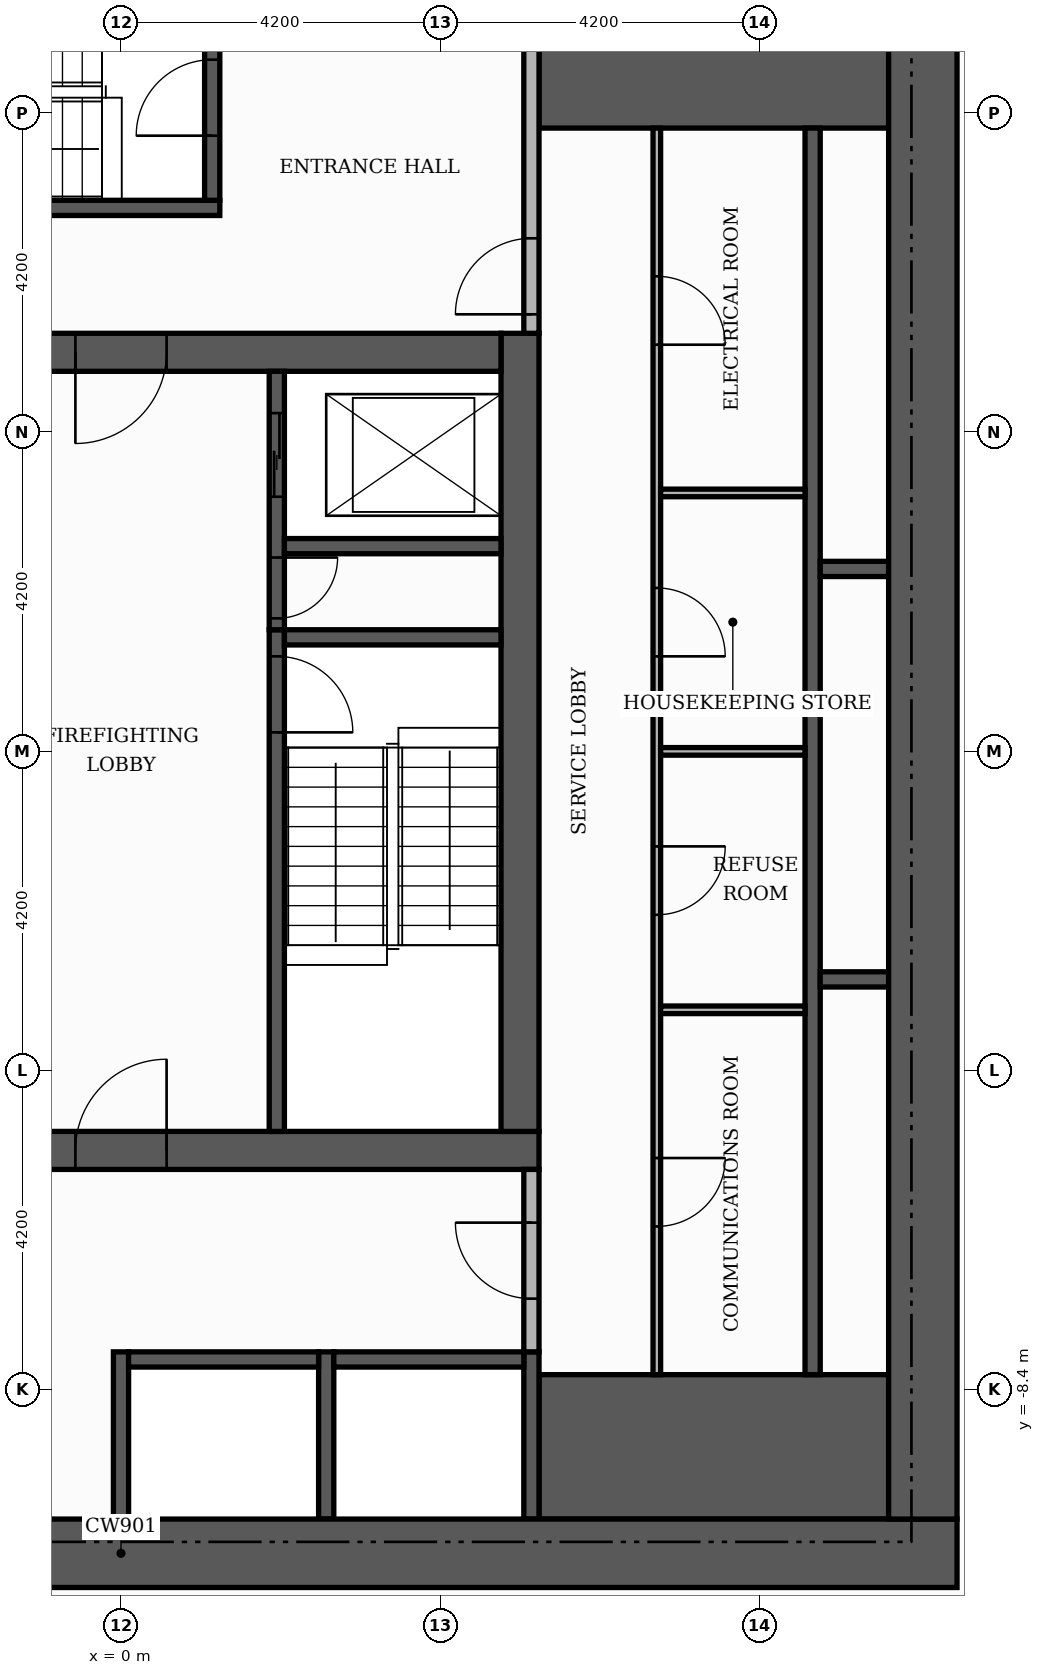
"""IFC4 building model, lengths in metres.
Left out: names, types, materials, properties, quantities, classifications, styles, units other than length and angle.
Written with IfcOpenShell. Run it as: python <this file> out.ifc"""

import sys

from ifc_helpers import new_model, si_unit, direction, frame, frame_2d, origin, place, context, subcontext, project, spatial, rectangle, extrude, element, fill, save


model = new_model("IFC4")
c1 = context("Model", 3, precision=1e-05, world=origin(), true_north=direction((0.0, 1.0)))
c2 = subcontext(c1, "Body", "Model", "MODEL_VIEW")
j1 = project(units=[si_unit("LENGTHUNIT", "METRE"), si_unit("PLANEANGLEUNIT", "RADIAN")], contexts=[c1])
p1 = place(None, origin())
s1 = spatial("IfcSite", under=j1, at=p1, CompositionType="ELEMENT")
p2 = place(p1, origin())
s2 = spatial("IfcBuilding", under=s1, at=p2, CompositionType="ELEMENT")
p3 = place(p2, frame((0.0, 0.0, 62.1)))
s3 = spatial("IfcBuildingStorey", under=s2, at=p3, CompositionType="ELEMENT", Elevation=62.1)
p4 = place(p3, frame((-5.5, -5.25, 0.0), z_axis=(0.0, 0.0, 1.0), x_axis=(1.0, 0.0, 0.0)))
e1 = element("IfcWall", 1, at=p4, inside=s3, PredefinedType="SHEAR", context=c2, shape_type="SweptSolid", body=[
    extrude(rectangle(XDim=11.0, YDim=0.5, at=frame_2d((5.5, 0.0))), origin(), (0.0, 0.0, 1.0), 3.48),
])
p5 = place(p4, frame((4.9, 0.0, 0.0)))
e2 = element("IfcOpeningElement", 2, at=p5, cuts=e1, PredefinedType="OPENING", context=c2, shape_type="SweptSolid", body=[
    extrude(rectangle(XDim=1.2, YDim=2.1, at=frame_2d((0.6, 1.05))), frame((0.0, 0.26, 0.0), z_axis=(0.0, -1.0, 0.0), x_axis=(1.0, 0.0, 0.0)), (0.0, 0.0, 1.0), 0.52),
])
p6 = place(p3, frame((5.25, -5.0, 0.0), z_axis=(0.0, 0.0, 1.0), x_axis=(0.0, 1.0, 0.0)))
e3 = element("IfcWall", 3, at=p6, inside=s3, PredefinedType="SHEAR", context=c2, shape_type="SweptSolid", body=[
    extrude(rectangle(XDim=10.5, YDim=0.5, at=frame_2d((5.25, 0.0))), origin(), (0.0, 0.0, 1.0), 3.48),
])
p7 = place(p3, frame((-5.0, 5.25, 0.0), z_axis=(0.0, 0.0, 1.0), x_axis=(1.0, 0.0, 0.0)))
e4 = element("IfcWall", 4, at=p7, inside=s3, PredefinedType="SHEAR", context=c2, shape_type="SweptSolid", body=[
    extrude(rectangle(XDim=10.0, YDim=0.5, at=frame_2d((5.0, 0.0))), origin(), (0.0, 0.0, 1.0), 3.48),
])
p8 = place(p7, frame((4.4, 0.0, 0.0)))
e5 = element("IfcOpeningElement", 5, at=p8, cuts=e4, PredefinedType="OPENING", context=c2, shape_type="SweptSolid", body=[
    extrude(rectangle(XDim=1.2, YDim=2.1, at=frame_2d((0.6, 1.05))), frame((0.0, 0.26, 0.0), z_axis=(0.0, -1.0, 0.0), x_axis=(1.0, 0.0, 0.0)), (0.0, 0.0, 1.0), 0.52),
])
for number, where, z_axis, x_axis in (
    (6, (5.5, -9.15, 0.0), (0.0, 0.0, 1.0), (1.0, 0.0, 0.0)),
    (7, (5.5, 9.15, 0.0), (0.0, 0.0, 1.0), (1.0, 0.0, 0.0)),
):
    element("IfcWall", number, at=place(p3, frame(where, z_axis=z_axis, x_axis=x_axis)), inside=s3, PredefinedType="SHEAR", context=c2, shape_type="SweptSolid", body=[
        extrude(rectangle(XDim=4.6, YDim=1.9, at=frame_2d((2.3, 0.0))), origin(), (0.0, 0.0, 1.0), 3.48),
    ])
p9 = place(p3, frame((2.05, -5.0, 0.0), z_axis=(0.0, 0.0, 1.0), x_axis=(0.0, 1.0, 0.0)))
e8 = element("IfcWall", 8, at=p9, inside=s3, PredefinedType="SHEAR", context=c2, shape_type="SweptSolid", body=[
    extrude(rectangle(XDim=6.6, YDim=0.2, at=frame_2d((3.3, 0.0))), origin(), (0.0, 0.0, 1.0), 3.48),
])
p10 = place(p9, frame((5.25, 0.0, 0.0)))
e9 = element("IfcOpeningElement", 9, at=p10, cuts=e8, PredefinedType="OPENING", context=c2, shape_type="SweptSolid", body=[
    extrude(rectangle(XDim=1.0, YDim=2.1, at=frame_2d((0.5, 1.05))), frame((0.0, 0.11, 0.0), z_axis=(0.0, -1.0, 0.0), x_axis=(1.0, 0.0, 0.0)), (0.0, 0.0, 1.0), 0.22),
])
p11 = place(p3, frame((2.15, 1.5, 0.0), z_axis=(0.0, 0.0, 1.0), x_axis=(1.0, 0.0, 0.0)))
e10 = element("IfcWall", 10, at=p11, inside=s3, PredefinedType="SHEAR", context=c2, shape_type="SweptSolid", body=[
    extrude(rectangle(XDim=2.85, YDim=0.2, at=frame_2d((1.425, 0.0))), origin(), (0.0, 0.0, 1.0), 3.48),
])
p12 = place(p3, frame((-5.5, 7.15, 0.0), z_axis=(0.0, 0.0, 1.0), x_axis=(1.0, 0.0, 0.0)))
e11 = element("IfcWall", 11, at=p12, inside=s3, PredefinedType="SHEAR", context=c2, shape_type="SweptSolid", body=[
    extrude(rectangle(XDim=6.8, YDim=0.2, at=frame_2d((3.4, 0.0))), origin(), (0.0, 0.0, 1.0), 3.48),
])
p13 = place(p3, frame((1.2, 7.25, 0.0), z_axis=(0.0, 0.0, 1.0), x_axis=(0.0, 1.0, 0.0)))
e12 = element("IfcWall", 12, at=p13, inside=s3, PredefinedType="SHEAR", context=c2, shape_type="SweptSolid", body=[
    extrude(rectangle(XDim=2.85, YDim=0.2, at=frame_2d((1.425, 0.0))), origin(), (0.0, 0.0, 1.0), 3.48),
])
p14 = place(p13, frame((0.85, 0.0, 0.0)))
e13 = element("IfcOpeningElement", 13, at=p14, cuts=e12, PredefinedType="OPENING", context=c2, shape_type="SweptSolid", body=[
    extrude(rectangle(XDim=1.0, YDim=2.1, at=frame_2d((0.5, 1.05))), frame((0.0, 0.11, 0.0), z_axis=(0.0, -1.0, 0.0), x_axis=(1.0, 0.0, 0.0)), (0.0, 0.0, 1.0), 0.22),
])
for number, where, z_axis, x_axis in (
    (14, (0.0, -10.1, 0.0), (0.0, 0.0, 1.0), (0.0, 1.0, 0.0)),
    (15, (2.7, -10.1, 0.0), (0.0, 0.0, 1.0), (0.0, 1.0, 0.0)),
    (16, (5.4, -10.1, 0.0), (0.0, 0.0, 1.0), (0.0, 1.0, 0.0)),
):
    element("IfcWall", number, at=place(p3, frame(where, z_axis=z_axis, x_axis=x_axis)), inside=s3, PredefinedType="SHEAR", context=c2, shape_type="SweptSolid", body=[
        extrude(rectangle(XDim=2.2, YDim=0.2, at=frame_2d((1.1, 0.0))), origin(), (0.0, 0.0, 1.0), 3.48),
    ])
p15 = place(p3, frame((9.1, -8.2, 0.0), z_axis=(0.0, 0.0, 1.0), x_axis=(0.0, 1.0, 0.0)))
e17 = element("IfcWall", 17, at=p15, inside=s3, PredefinedType="SHEAR", context=c2, shape_type="SweptSolid", body=[
    extrude(rectangle(XDim=16.4, YDim=0.2, at=frame_2d((8.2, 0.0))), origin(), (0.0, 0.0, 1.0), 3.48),
])
for number, where, z_axis, x_axis in (
    (18, (0.1, -8.0, 0.0), (0.0, 0.0, 1.0), (1.0, 0.0, 0.0)),
    (19, (2.8, -8.0, 0.0), (0.0, 0.0, 1.0), (1.0, 0.0, 0.0)),
):
    element("IfcWall", number, at=place(p3, frame(where, z_axis=z_axis, x_axis=x_axis)), inside=s3, PredefinedType="SHEAR", context=c2, shape_type="SweptSolid", body=[
        extrude(rectangle(XDim=2.5, YDim=0.2, at=frame_2d((1.25, 0.0))), origin(), (0.0, 0.0, 1.0), 3.48),
    ])
p16 = place(p3, frame((9.2, -3.0, 0.0), z_axis=(0.0, 0.0, 1.0), x_axis=(1.0, 0.0, 0.0)))
e20 = element("IfcWall", 20, at=p16, inside=s3, PredefinedType="SHEAR", context=c2, shape_type="SweptSolid", body=[
    extrude(rectangle(XDim=0.9, YDim=0.2, at=frame_2d((0.45, 0.0))), origin(), (0.0, 0.0, 1.0), 3.48),
])
p17 = place(p3, frame((2.05, 1.6, 0.0), z_axis=(0.0, 0.0, 1.0), x_axis=(0.0, 1.0, 0.0)))
e21 = element("IfcWall", 21, at=p17, inside=s3, PredefinedType="SHEAR", context=c2, shape_type="SweptSolid", body=[
    extrude(rectangle(XDim=3.4, YDim=0.2, at=frame_2d((1.7, 0.0))), origin(), (0.0, 0.0, 1.0), 3.48),
])
p18 = place(p17, frame((1.75, 0.0, 0.0)))
e22 = element("IfcOpeningElement", 22, at=p18, cuts=e21, PredefinedType="OPENING", context=c2, shape_type="SweptSolid", body=[
    extrude(rectangle(XDim=1.1, YDim=2.1, at=frame_2d((0.55, 1.05))), frame((0.0, 0.11, 0.0), z_axis=(0.0, -1.0, 0.0), x_axis=(1.0, 0.0, 0.0)), (0.0, 0.0, 1.0), 0.22),
])
p19 = place(p17, frame((0.15, 0.0, 0.0)))
e23 = element("IfcOpeningElement", 23, at=p19, cuts=e21, PredefinedType="OPENING", context=c2, shape_type="SweptSolid", body=[
    extrude(rectangle(XDim=0.8, YDim=2.1, at=frame_2d((0.4, 1.05))), frame((0.0, 0.11, 0.0), z_axis=(0.0, -1.0, 0.0), x_axis=(1.0, 0.0, 0.0)), (0.0, 0.0, 1.0), 0.22),
])
p20 = place(p3, frame((9.2, 2.4, 0.0), z_axis=(0.0, 0.0, 1.0), x_axis=(1.0, 0.0, 0.0)))
e24 = element("IfcWall", 24, at=p20, inside=s3, PredefinedType="SHEAR", context=c2, shape_type="SweptSolid", body=[
    extrude(rectangle(XDim=0.9, YDim=0.2, at=frame_2d((0.45, 0.0))), origin(), (0.0, 0.0, 1.0), 3.48),
])
p21 = place(p3, frame((2.15, 2.7, 0.0), z_axis=(0.0, 0.0, 1.0), x_axis=(1.0, 0.0, 0.0)))
e25 = element("IfcWall", 25, at=p21, inside=s3, PredefinedType="SHEAR", context=c2, shape_type="SweptSolid", body=[
    extrude(rectangle(XDim=2.85, YDim=0.2, at=frame_2d((1.425, 0.0))), origin(), (0.0, 0.0, 1.0), 3.48),
])
p22 = place(p3, frame((-11.0, -10.55, 0.0), z_axis=(0.0, 0.0, 1.0), x_axis=(1.0, 0.0, 0.0)))
e26 = element("IfcWall", 26, at=p22, inside=s3, PredefinedType="SHEAR", context=c2, shape_type="SweptSolid", body=[
    extrude(rectangle(XDim=22.0, YDim=0.9, at=frame_2d((11.0, 0.0))), origin(), (0.0, 0.0, 1.0), 3.48),
])
p23 = place(p22, frame((7.4, 0.0, 0.0)))
e27 = element("IfcOpeningElement", 27, at=p23, cuts=e26, PredefinedType="OPENING", context=c2, shape_type="SweptSolid", body=[
    extrude(rectangle(XDim=1.8, YDim=2.2, at=frame_2d((0.9, 1.1))), frame((0.0, 0.46, 0.0), z_axis=(0.0, -1.0, 0.0), x_axis=(1.0, 0.0, 0.0)), (0.0, 0.0, 1.0), 0.92),
])
p24 = place(p3, frame((10.55, -10.1, 0.0), z_axis=(0.0, 0.0, 1.0), x_axis=(0.0, 1.0, 0.0)))
e28 = element("IfcWall", 28, at=p24, inside=s3, PredefinedType="SHEAR", context=c2, shape_type="SweptSolid", body=[
    extrude(rectangle(XDim=20.2, YDim=0.9, at=frame_2d((10.1, 0.0))), origin(), (0.0, 0.0, 1.0), 3.48),
])
p25 = place(p3, frame((7.05, -8.2, 0.0), z_axis=(0.0, 0.0, 1.0), x_axis=(0.0, 1.0, 0.0)))
e29 = element("IfcWall", 29, at=p25, inside=s3, PredefinedType="PARTITIONING", context=c2, shape_type="SweptSolid", body=[
    extrude(rectangle(XDim=16.4, YDim=0.1, at=frame_2d((8.2, 0.0))), origin(), (0.0, 0.0, 1.0), 3.48),
])
p26 = place(p25, frame((1.95, 0.0, 0.0)))
e30 = element("IfcOpeningElement", 30, at=p26, cuts=e29, PredefinedType="OPENING", context=c2, shape_type="SweptSolid", body=[
    extrude(rectangle(XDim=0.9, YDim=2.1, at=frame_2d((0.45, 1.05))), frame((0.0, 0.06, 0.0), z_axis=(0.0, -1.0, 0.0), x_axis=(1.0, 0.0, 0.0)), (0.0, 0.0, 1.0), 0.12),
])
p27 = place(p25, frame((6.05, 0.0, 0.0)))
e31 = element("IfcOpeningElement", 31, at=p27, cuts=e29, PredefinedType="OPENING", context=c2, shape_type="SweptSolid", body=[
    extrude(rectangle(XDim=0.9, YDim=2.1, at=frame_2d((0.45, 1.05))), frame((0.0, 0.06, 0.0), z_axis=(0.0, -1.0, 0.0), x_axis=(1.0, 0.0, 0.0)), (0.0, 0.0, 1.0), 0.12),
])
p28 = place(p25, frame((9.45, 0.0, 0.0)))
e32 = element("IfcOpeningElement", 32, at=p28, cuts=e29, PredefinedType="OPENING", context=c2, shape_type="SweptSolid", body=[
    extrude(rectangle(XDim=0.9, YDim=2.1, at=frame_2d((0.45, 1.05))), frame((0.0, 0.06, 0.0), z_axis=(0.0, -1.0, 0.0), x_axis=(1.0, 0.0, 0.0)), (0.0, 0.0, 1.0), 0.12),
])
p29 = place(p25, frame((13.55, 0.0, 0.0)))
e33 = element("IfcOpeningElement", 33, at=p29, cuts=e29, PredefinedType="OPENING", context=c2, shape_type="SweptSolid", body=[
    extrude(rectangle(XDim=0.9, YDim=2.1, at=frame_2d((0.45, 1.05))), frame((0.0, 0.06, 0.0), z_axis=(0.0, -1.0, 0.0), x_axis=(1.0, 0.0, 0.0)), (0.0, 0.0, 1.0), 0.12),
])
p30 = place(p3, frame((5.4, -7.9, 0.0), z_axis=(0.0, 0.0, 1.0), x_axis=(0.0, 1.0, 0.0)))
e34 = element("IfcWall", 34, at=p30, inside=s3, PredefinedType="PARTITIONING", context=c2, shape_type="SweptSolid", body=[
    extrude(rectangle(XDim=2.4, YDim=0.2, at=frame_2d((1.2, 0.0))), origin(), (0.0, 0.0, 1.0), 3.48),
])
p31 = place(p30, frame((0.7, 0.0, 0.0)))
e35 = element("IfcOpeningElement", 35, at=p31, cuts=e34, PredefinedType="OPENING", context=c2, shape_type="SweptSolid", body=[
    extrude(rectangle(XDim=1.0, YDim=2.1, at=frame_2d((0.5, 1.05))), frame((0.0, 0.11, 0.0), z_axis=(0.0, -1.0, 0.0), x_axis=(1.0, 0.0, 0.0)), (0.0, 0.0, 1.0), 0.22),
])
for number, where, z_axis, x_axis in (
    (36, (7.1, -3.4, 0.0), (0.0, 0.0, 1.0), (1.0, 0.0, 0.0)),
    (37, (7.1, 0.0, 0.0), (0.0, 0.0, 1.0), (1.0, 0.0, 0.0)),
    (38, (7.1, 3.4, 0.0), (0.0, 0.0, 1.0), (1.0, 0.0, 0.0)),
):
    element("IfcWall", number, at=place(p3, frame(where, z_axis=z_axis, x_axis=x_axis)), inside=s3, PredefinedType="PARTITIONING", context=c2, shape_type="SweptSolid", body=[
        extrude(rectangle(XDim=1.9, YDim=0.1, at=frame_2d((0.95, 0.0))), origin(), (0.0, 0.0, 1.0), 3.48),
    ])
p32 = place(p3, frame((5.4, 5.5, 0.0), z_axis=(0.0, 0.0, 1.0), x_axis=(0.0, 1.0, 0.0)))
e39 = element("IfcWall", 39, at=p32, inside=s3, PredefinedType="PARTITIONING", context=c2, shape_type="SweptSolid", body=[
    extrude(rectangle(XDim=4.6, YDim=0.2, at=frame_2d((2.3, 0.0))), origin(), (0.0, 0.0, 1.0), 3.48),
])
p33 = place(p32, frame((0.25, 0.0, 0.0)))
e40 = element("IfcOpeningElement", 40, at=p33, cuts=e39, PredefinedType="OPENING", context=c2, shape_type="SweptSolid", body=[
    extrude(rectangle(XDim=1.0, YDim=2.1, at=frame_2d((0.5, 1.05))), frame((0.0, 0.11, 0.0), z_axis=(0.0, -1.0, 0.0), x_axis=(1.0, 0.0, 0.0)), (0.0, 0.0, 1.0), 0.22),
])
p34 = place(p18, origin())
e41 = element("IfcDoor", 41, at=p34, inside=s3, OperationType="SLIDING_TO_LEFT", PredefinedType="DOOR", context=c2, shape_type="SweptSolid", body=[
    extrude(rectangle(XDim=1.1, YDim=2.1, at=frame_2d((0.55, 1.05))), frame((0.0, 0.025, 0.0), z_axis=(0.0, -1.0, 0.0), x_axis=(1.0, 0.0, 0.0)), (0.0, 0.0, 1.0), 0.05),
])
fill(e22, e41)
p35 = place(p10, frame((1.0, 0.0, 0.0), z_axis=(0.0, 0.0, 1.0), x_axis=(-1.0, 0.0, 0.0)))
e42 = element("IfcDoor", 42, at=p35, inside=s3, OperationType="SINGLE_SWING_LEFT", PredefinedType="DOOR", context=c2, shape_type="SweptSolid", body=[
    extrude(rectangle(XDim=1.0, YDim=2.1, at=frame_2d((0.5, 1.05))), frame((0.0, 0.025, 0.0), z_axis=(0.0, -1.0, 0.0), x_axis=(1.0, 0.0, 0.0)), (0.0, 0.0, 1.0), 0.05),
])
fill(e9, e42)
p36 = place(p19, frame((0.8, 0.0, 0.0), z_axis=(0.0, 0.0, 1.0), x_axis=(-1.0, 0.0, 0.0)))
e43 = element("IfcDoor", 43, at=p36, inside=s3, OperationType="SINGLE_SWING_RIGHT", PredefinedType="DOOR", context=c2, shape_type="SweptSolid", body=[
    extrude(rectangle(XDim=0.8, YDim=2.1, at=frame_2d((0.4, 1.05))), frame((0.0, 0.025, 0.0), z_axis=(0.0, -1.0, 0.0), x_axis=(1.0, 0.0, 0.0)), (0.0, 0.0, 1.0), 0.05),
])
fill(e23, e43)
p37 = place(p8, frame((1.2, 0.0, 0.0), z_axis=(0.0, 0.0, 1.0), x_axis=(-1.0, 0.0, 0.0)))
e44 = element("IfcDoor", 44, at=p37, inside=s3, OperationType="SINGLE_SWING_LEFT", PredefinedType="DOOR", context=c2, shape_type="SweptSolid", body=[
    extrude(rectangle(XDim=1.2, YDim=2.1, at=frame_2d((0.6, 1.05))), frame((0.0, 0.025, 0.0), z_axis=(0.0, -1.0, 0.0), x_axis=(1.0, 0.0, 0.0)), (0.0, 0.0, 1.0), 0.05),
])
fill(e5, e44)
p38 = place(p5, origin())
e45 = element("IfcDoor", 45, at=p38, inside=s3, OperationType="SINGLE_SWING_RIGHT", PredefinedType="DOOR", context=c2, shape_type="SweptSolid", body=[
    extrude(rectangle(XDim=1.2, YDim=2.1, at=frame_2d((0.6, 1.05))), frame((0.0, 0.025, 0.0), z_axis=(0.0, -1.0, 0.0), x_axis=(1.0, 0.0, 0.0)), (0.0, 0.0, 1.0), 0.05),
])
fill(e2, e45)
p39 = place(p14, origin())
e46 = element("IfcDoor", 46, at=p39, inside=s3, OperationType="SINGLE_SWING_LEFT", PredefinedType="DOOR", context=c2, shape_type="SweptSolid", body=[
    extrude(rectangle(XDim=1.0, YDim=2.1, at=frame_2d((0.5, 1.05))), frame((0.0, 0.025, 0.0), z_axis=(0.0, -1.0, 0.0), x_axis=(1.0, 0.0, 0.0)), (0.0, 0.0, 1.0), 0.05),
])
fill(e13, e46)
p40 = place(p33, origin())
e47 = element("IfcDoor", 47, at=p40, inside=s3, OperationType="SINGLE_SWING_LEFT", PredefinedType="DOOR", context=c2, shape_type="SweptSolid", body=[
    extrude(rectangle(XDim=1.0, YDim=2.1, at=frame_2d((0.5, 1.05))), frame((0.0, 0.025, 0.0), z_axis=(0.0, -1.0, 0.0), x_axis=(1.0, 0.0, 0.0)), (0.0, 0.0, 1.0), 0.05),
])
fill(e40, e47)
p41 = place(p31, origin())
e48 = element("IfcDoor", 48, at=p41, inside=s3, OperationType="SINGLE_SWING_RIGHT", PredefinedType="DOOR", context=c2, shape_type="SweptSolid", body=[
    extrude(rectangle(XDim=1.0, YDim=2.1, at=frame_2d((0.5, 1.05))), frame((0.0, 0.025, 0.0), z_axis=(0.0, -1.0, 0.0), x_axis=(1.0, 0.0, 0.0)), (0.0, 0.0, 1.0), 0.05),
])
fill(e35, e48)
p42 = place(p26, frame((0.9, 0.0, 0.0), z_axis=(0.0, 0.0, 1.0), x_axis=(-1.0, 0.0, 0.0)))
e49 = element("IfcDoor", 49, at=p42, inside=s3, OperationType="SINGLE_SWING_RIGHT", PredefinedType="DOOR", context=c2, shape_type="SweptSolid", body=[
    extrude(rectangle(XDim=0.9, YDim=2.1, at=frame_2d((0.45, 1.05))), frame((0.0, 0.025, 0.0), z_axis=(0.0, -1.0, 0.0), x_axis=(1.0, 0.0, 0.0)), (0.0, 0.0, 1.0), 0.05),
])
fill(e30, e49)
p43 = place(p27, frame((0.9, 0.0, 0.0), z_axis=(0.0, 0.0, 1.0), x_axis=(-1.0, 0.0, 0.0)))
e50 = element("IfcDoor", 50, at=p43, inside=s3, OperationType="SINGLE_SWING_RIGHT", PredefinedType="DOOR", context=c2, shape_type="SweptSolid", body=[
    extrude(rectangle(XDim=0.9, YDim=2.1, at=frame_2d((0.45, 1.05))), frame((0.0, 0.025, 0.0), z_axis=(0.0, -1.0, 0.0), x_axis=(1.0, 0.0, 0.0)), (0.0, 0.0, 1.0), 0.05),
])
fill(e31, e50)
p44 = place(p28, frame((0.9, 0.0, 0.0), z_axis=(0.0, 0.0, 1.0), x_axis=(-1.0, 0.0, 0.0)))
e51 = element("IfcDoor", 51, at=p44, inside=s3, OperationType="SINGLE_SWING_LEFT", PredefinedType="DOOR", context=c2, shape_type="SweptSolid", body=[
    extrude(rectangle(XDim=0.9, YDim=2.1, at=frame_2d((0.45, 1.05))), frame((0.0, 0.025, 0.0), z_axis=(0.0, -1.0, 0.0), x_axis=(1.0, 0.0, 0.0)), (0.0, 0.0, 1.0), 0.05),
])
fill(e32, e51)
p45 = place(p29, frame((0.9, 0.0, 0.0), z_axis=(0.0, 0.0, 1.0), x_axis=(-1.0, 0.0, 0.0)))
e52 = element("IfcDoor", 52, at=p45, inside=s3, OperationType="SINGLE_SWING_LEFT", PredefinedType="DOOR", context=c2, shape_type="SweptSolid", body=[
    extrude(rectangle(XDim=0.9, YDim=2.1, at=frame_2d((0.45, 1.05))), frame((0.0, 0.025, 0.0), z_axis=(0.0, -1.0, 0.0), x_axis=(1.0, 0.0, 0.0)), (0.0, 0.0, 1.0), 0.05),
])
fill(e33, e52)
save(model, sys.argv[1])
